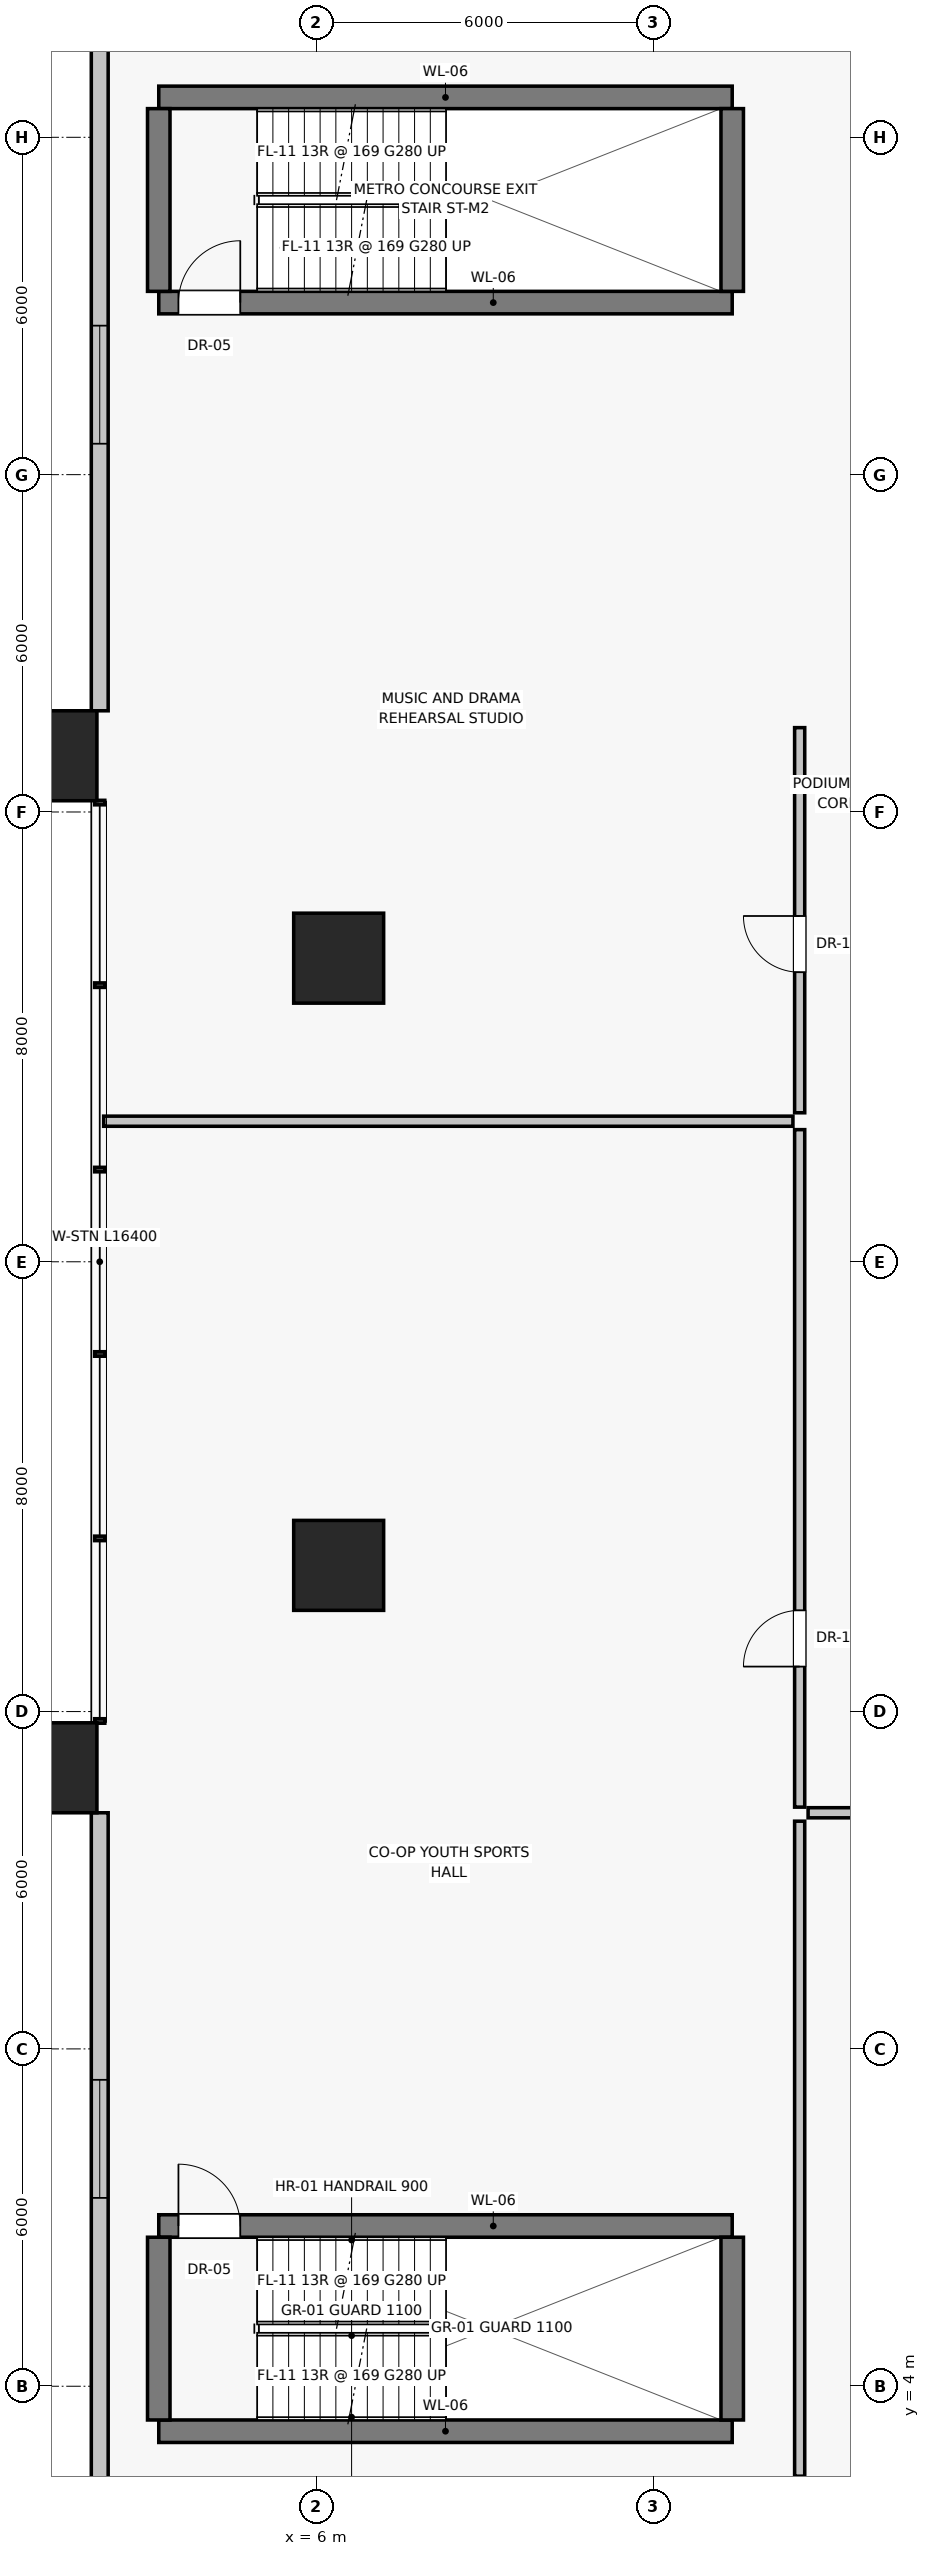
"""IFC4 building model, lengths in metres.
Left out: names, types, materials, properties, quantities, classifications, styles, units other than length and angle.
Written with IfcOpenShell. Run it as: python <this file> out.ifc"""

import sys

from ifc_helpers import new_model, si_unit, direction, frame, frame_2d, origin, origin_2d, place, context, subcontext, project, spatial, rectangle, extrude, source, transform, mapped, element, fill, save


model = new_model("IFC4")
c1 = context("Model", 3, precision=1e-05, world=origin(), true_north=direction((0.0, 1.0)))
c2 = subcontext(c1, "Body", "Model", "MODEL_VIEW")
j1 = project(units=[si_unit("LENGTHUNIT", "METRE"), si_unit("PLANEANGLEUNIT", "RADIAN")], contexts=[c1])
p1 = place(None, origin())
s1 = spatial("IfcSite", under=j1, at=p1, CompositionType="ELEMENT")
p2 = place(p1, origin())
s2 = spatial("IfcBuilding", under=s1, at=p2, CompositionType="ELEMENT")
p3 = place(p2, frame((0.0, 0.0, 14.0)))
s3 = spatial("IfcBuildingStorey", under=s2, at=p3, CompositionType="ELEMENT", Elevation=14.0)
for number, where, z_axis, x_axis in (
    (1, (1.3, 15.0, 0.0), (0.0, 0.0, 1.0), (1.0, 0.0, 0.0)),
    (2, (1.3, 33.0, 0.0), (0.0, 0.0, 1.0), (1.0, 0.0, 0.0)),
    (3, (6.4, 29.4, 0.0), (0.0, 0.0, 1.0), (1.0, 0.0, 0.0)),
    (4, (6.4, 18.6, 0.0), (0.0, 0.0, 1.0), (1.0, 0.0, 0.0)),
):
    element("IfcColumn", number, at=place(p3, frame(where, z_axis=z_axis, x_axis=x_axis)), inside=s3, PredefinedType="COLUMN", context=c2, shape_type="SweptSolid", body=[
        extrude(rectangle(XDim=1.6, YDim=1.6, at=origin_2d()), origin(), (0.0, 0.0, 1.0), 4.4),
    ])
p4 = place(p3, frame((2.15, 45.7, 0.0), z_axis=(0.0, 0.0, 1.0), x_axis=(0.0, -1.0, 0.0)))
e5 = element("IfcWall", 5, at=p4, inside=s3, PredefinedType="SOLIDWALL", context=c2, shape_type="SweptSolid", body=[
    extrude(rectangle(XDim=11.9, YDim=0.3, at=frame_2d((5.95, 0.0))), origin(), (0.0, 0.0, 1.0), 3.0),
])
p5 = place(p4, frame((5.05, 0.0, 0.85)))
e6 = element("IfcOpeningElement", 6, at=p5, cuts=e5, PredefinedType="OPENING", context=c2, shape_type="SweptSolid", body=[
    extrude(rectangle(XDim=2.1, YDim=1.75, at=frame_2d((1.05, 0.875))), frame((0.0, 0.16, 0.0), z_axis=(0.0, -1.0, 0.0), x_axis=(1.0, 0.0, 0.0)), (0.0, 0.0, 1.0), 0.32),
])
p6 = place(p3, frame((2.15, 14.2, 0.0), z_axis=(0.0, 0.0, 1.0), x_axis=(0.0, -1.0, 0.0)))
e7 = element("IfcWall", 7, at=p6, inside=s3, PredefinedType="SOLIDWALL", context=c2, shape_type="SweptSolid", body=[
    extrude(rectangle(XDim=11.9, YDim=0.3, at=frame_2d((5.95, 0.0))), origin(), (0.0, 0.0, 1.0), 3.0),
])
p7 = place(p6, frame((4.75, 0.0, 0.85)))
e8 = element("IfcOpeningElement", 8, at=p7, cuts=e7, PredefinedType="OPENING", context=c2, shape_type="SweptSolid", body=[
    extrude(rectangle(XDim=2.1, YDim=1.75, at=frame_2d((1.05, 0.875))), frame((0.0, 0.16, 0.0), z_axis=(0.0, -1.0, 0.0), x_axis=(1.0, 0.0, 0.0)), (0.0, 0.0, 1.0), 0.32),
])
p8 = place(p3, frame((3.2, 3.2, 0.0), z_axis=(0.0, 0.0, 1.0), x_axis=(1.0, 0.0, 0.0)))
e9 = element("IfcWall", 9, at=p8, inside=s3, PredefinedType="SHEAR", context=c2, shape_type="SweptSolid", body=[
    extrude(rectangle(XDim=10.2, YDim=0.4, at=frame_2d((5.1, 0.0))), origin(), (0.0, 0.0, 1.0), 4.1),
])
p9 = place(p3, frame((3.2, 6.85, 0.0), z_axis=(0.0, 0.0, 1.0), x_axis=(1.0, 0.0, 0.0)))
e10 = element("IfcWall", 10, at=p9, inside=s3, PredefinedType="SHEAR", context=c2, shape_type="SweptSolid", body=[
    extrude(rectangle(XDim=10.2, YDim=0.4, at=frame_2d((5.1, 0.0))), origin(), (0.0, 0.0, 1.0), 4.1),
])
p10 = place(p9, frame((0.35, 0.0, 0.0)))
e11 = element("IfcOpeningElement", 11, at=p10, cuts=e10, PredefinedType="OPENING", context=c2, shape_type="SweptSolid", body=[
    extrude(rectangle(XDim=1.1, YDim=2.03, at=frame_2d((0.55, 1.015))), frame((0.0, 0.21, 0.0), z_axis=(0.0, -1.0, 0.0), x_axis=(1.0, 0.0, 0.0)), (0.0, 0.0, 1.0), 0.42),
])
for number, where, z_axis, x_axis in (
    (12, (3.2, 3.4, 0.0), (0.0, 0.0, 1.0), (0.0, 1.0, 0.0)),
    (13, (13.4, 3.4, 0.0), (0.0, 0.0, 1.0), (0.0, 1.0, 0.0)),
):
    element("IfcWall", number, at=place(p3, frame(where, z_axis=z_axis, x_axis=x_axis)), inside=s3, PredefinedType="SHEAR", context=c2, shape_type="SweptSolid", body=[
        extrude(rectangle(XDim=3.25, YDim=0.4, at=frame_2d((1.625, 0.0))), origin(), (0.0, 0.0, 1.0), 4.1),
    ])
p11 = place(p3, frame((3.2, 41.06, 0.0), z_axis=(0.0, 0.0, 1.0), x_axis=(1.0, 0.0, 0.0)))
e14 = element("IfcWall", 14, at=p11, inside=s3, PredefinedType="SHEAR", context=c2, shape_type="SweptSolid", body=[
    extrude(rectangle(XDim=10.2, YDim=0.4, at=frame_2d((5.1, 0.0))), origin(), (0.0, 0.0, 1.0), 4.1),
])
p12 = place(p11, frame((0.35, 0.0, 0.0)))
e15 = element("IfcOpeningElement", 15, at=p12, cuts=e14, PredefinedType="OPENING", context=c2, shape_type="SweptSolid", body=[
    extrude(rectangle(XDim=1.1, YDim=2.03, at=frame_2d((0.55, 1.015))), frame((0.0, 0.21, 0.0), z_axis=(0.0, -1.0, 0.0), x_axis=(1.0, 0.0, 0.0)), (0.0, 0.0, 1.0), 0.42),
])
p13 = place(p3, frame((3.2, 44.71, 0.0), z_axis=(0.0, 0.0, 1.0), x_axis=(1.0, 0.0, 0.0)))
e16 = element("IfcWall", 16, at=p13, inside=s3, PredefinedType="SHEAR", context=c2, shape_type="SweptSolid", body=[
    extrude(rectangle(XDim=10.2, YDim=0.4, at=frame_2d((5.1, 0.0))), origin(), (0.0, 0.0, 1.0), 4.1),
])
for number, where, z_axis, x_axis in (
    (17, (3.2, 41.26, 0.0), (0.0, 0.0, 1.0), (0.0, 1.0, 0.0)),
    (18, (13.4, 41.26, 0.0), (0.0, 0.0, 1.0), (0.0, 1.0, 0.0)),
):
    element("IfcWall", number, at=place(p3, frame(where, z_axis=z_axis, x_axis=x_axis)), inside=s3, PredefinedType="SHEAR", context=c2, shape_type="SweptSolid", body=[
        extrude(rectangle(XDim=3.25, YDim=0.4, at=frame_2d((1.625, 0.0))), origin(), (0.0, 0.0, 1.0), 4.1),
    ])
p14 = place(p3, frame((14.6, 14.3, 0.0), z_axis=(0.0, 0.0, 1.0), x_axis=(0.0, 1.0, 0.0)))
e19 = element("IfcWall", 19, at=p14, inside=s3, PredefinedType="PARTITIONING", context=c2, shape_type="SweptSolid", body=[
    extrude(rectangle(XDim=12.05, YDim=0.18, at=frame_2d((6.025, 0.0))), origin(), (0.0, 0.0, 1.0), 4.1),
])
p15 = place(p14, frame((2.5, 0.0, 0.0)))
e20 = element("IfcOpeningElement", 20, at=p15, cuts=e19, PredefinedType="OPENING", context=c2, shape_type="SweptSolid", body=[
    extrude(rectangle(XDim=1.0, YDim=2.01, at=frame_2d((0.5, 1.005))), frame((0.0, 0.1, 0.0), z_axis=(0.0, -1.0, 0.0), x_axis=(1.0, 0.0, 0.0)), (0.0, 0.0, 1.0), 0.2),
])
p16 = place(p3, frame((14.6, 26.65, 0.0), z_axis=(0.0, 0.0, 1.0), x_axis=(0.0, 1.0, 0.0)))
e21 = element("IfcWall", 21, at=p16, inside=s3, PredefinedType="PARTITIONING", context=c2, shape_type="SweptSolid", body=[
    extrude(rectangle(XDim=6.85, YDim=0.18, at=frame_2d((3.425, 0.0))), origin(), (0.0, 0.0, 1.0), 4.1),
])
p17 = place(p16, frame((2.5, 0.0, 0.0)))
e22 = element("IfcOpeningElement", 22, at=p17, cuts=e21, PredefinedType="OPENING", context=c2, shape_type="SweptSolid", body=[
    extrude(rectangle(XDim=1.0, YDim=2.01, at=frame_2d((0.5, 1.005))), frame((0.0, 0.1, 0.0), z_axis=(0.0, -1.0, 0.0), x_axis=(1.0, 0.0, 0.0)), (0.0, 0.0, 1.0), 0.2),
])
p18 = place(p3, frame((2.22, 26.5, 0.0), z_axis=(0.0, 0.0, 1.0), x_axis=(1.0, 0.0, 0.0)))
e23 = element("IfcWall", 23, at=p18, inside=s3, PredefinedType="PARTITIONING", context=c2, shape_type="SweptSolid", body=[
    extrude(rectangle(XDim=12.26, YDim=0.18, at=frame_2d((6.13, 0.0))), origin(), (0.0, 0.0, 1.0), 4.1),
])
p19 = place(p3, frame((14.6, 2.4, 0.0), z_axis=(0.0, 0.0, 1.0), x_axis=(0.0, 1.0, 0.0)))
e24 = element("IfcWall", 24, at=p19, inside=s3, PredefinedType="PARTITIONING", context=c2, shape_type="SweptSolid", body=[
    extrude(rectangle(XDim=11.65, YDim=0.18, at=frame_2d((5.825, 0.0))), origin(), (0.0, 0.0, 1.0), 4.1),
])
p20 = place(p3, frame((14.75, 14.2, 0.0), z_axis=(0.0, 0.0, 1.0), x_axis=(1.0, 0.0, 0.0)))
e25 = element("IfcWall", 25, at=p20, inside=s3, PredefinedType="PARTITIONING", context=c2, shape_type="SweptSolid", body=[
    extrude(rectangle(XDim=7.6, YDim=0.18, at=frame_2d((3.8, 0.0))), origin(), (0.0, 0.0, 1.0), 4.1),
])
p21 = place(p20, frame((2.5, 0.0, 0.0)))
e26 = element("IfcOpeningElement", 26, at=p21, cuts=e25, PredefinedType="OPENING", context=c2, shape_type="SweptSolid", body=[
    extrude(rectangle(XDim=1.0, YDim=2.01, at=frame_2d((0.5, 1.005))), frame((0.0, 0.1, 0.0), z_axis=(0.0, -1.0, 0.0), x_axis=(1.0, 0.0, 0.0)), (0.0, 0.0, 1.0), 0.2),
])
m1 = source(origin(), c2, "Body", "SweptSolid", [
    extrude(rectangle(XDim=2.1, YDim=1.75, at=frame_2d((1.05, 0.875))), frame((0.0, 0.03, 0.0), z_axis=(0.0, -1.0, 0.0), x_axis=(1.0, 0.0, 0.0)), (0.0, 0.0, 1.0), 0.06),
])
p22 = place(p5, origin())
e27 = element("IfcWindow", 27, at=p22, inside=s3, PartitioningType="DOUBLE_PANEL_VERTICAL", PredefinedType="WINDOW", context=c2, shape_type="MappedRepresentation", body=[
    mapped(m1, transform((0.0, 0.0, 0.0), scale=1.0)),
])
fill(e6, e27)
p23 = place(p7, origin())
e28 = element("IfcWindow", 28, at=p23, inside=s3, PartitioningType="DOUBLE_PANEL_VERTICAL", PredefinedType="WINDOW", context=c2, shape_type="MappedRepresentation", body=[
    mapped(m1, transform((0.0, 0.0, 0.0), scale=1.0)),
])
fill(e8, e28)
m2 = source(origin(), c2, "Body", "SweptSolid", [
    extrude(rectangle(XDim=1.1, YDim=2.03, at=frame_2d((0.55, 1.015))), frame((0.0, 0.025, 0.0), z_axis=(0.0, -1.0, 0.0), x_axis=(1.0, 0.0, 0.0)), (0.0, 0.0, 1.0), 0.05),
])
p24 = place(p10, origin())
e29 = element("IfcDoor", 29, at=p24, inside=s3, OperationType="SINGLE_SWING_LEFT", PredefinedType="DOOR", context=c2, shape_type="MappedRepresentation", body=[
    mapped(m2, transform((0.0, 0.0, 0.0), scale=1.0)),
])
fill(e11, e29)
p25 = place(p12, origin())
e30 = element("IfcDoor", 30, at=p25, inside=s3, OperationType="SINGLE_SWING_RIGHT", PredefinedType="DOOR", context=c2, shape_type="MappedRepresentation", body=[
    mapped(m2, transform((0.0, 0.0, 0.0), scale=1.0)),
])
fill(e15, e30)
m3 = source(origin(), c2, "Body", "SweptSolid", [
    extrude(rectangle(XDim=1.0, YDim=2.01, at=frame_2d((0.5, 1.005))), frame((0.0, 0.025, 0.0), z_axis=(0.0, -1.0, 0.0), x_axis=(1.0, 0.0, 0.0)), (0.0, 0.0, 1.0), 0.05),
])
p26 = place(p15, origin())
e31 = element("IfcDoor", 31, at=p26, inside=s3, OperationType="SINGLE_SWING_LEFT", PredefinedType="DOOR", context=c2, shape_type="MappedRepresentation", body=[
    mapped(m3, transform((0.0, 0.0, 0.0), scale=1.0)),
])
fill(e20, e31)
p27 = place(p17, origin())
e32 = element("IfcDoor", 32, at=p27, inside=s3, OperationType="SINGLE_SWING_RIGHT", PredefinedType="DOOR", context=c2, shape_type="MappedRepresentation", body=[
    mapped(m3, transform((0.0, 0.0, 0.0), scale=1.0)),
])
fill(e22, e32)
save(model, sys.argv[1])
